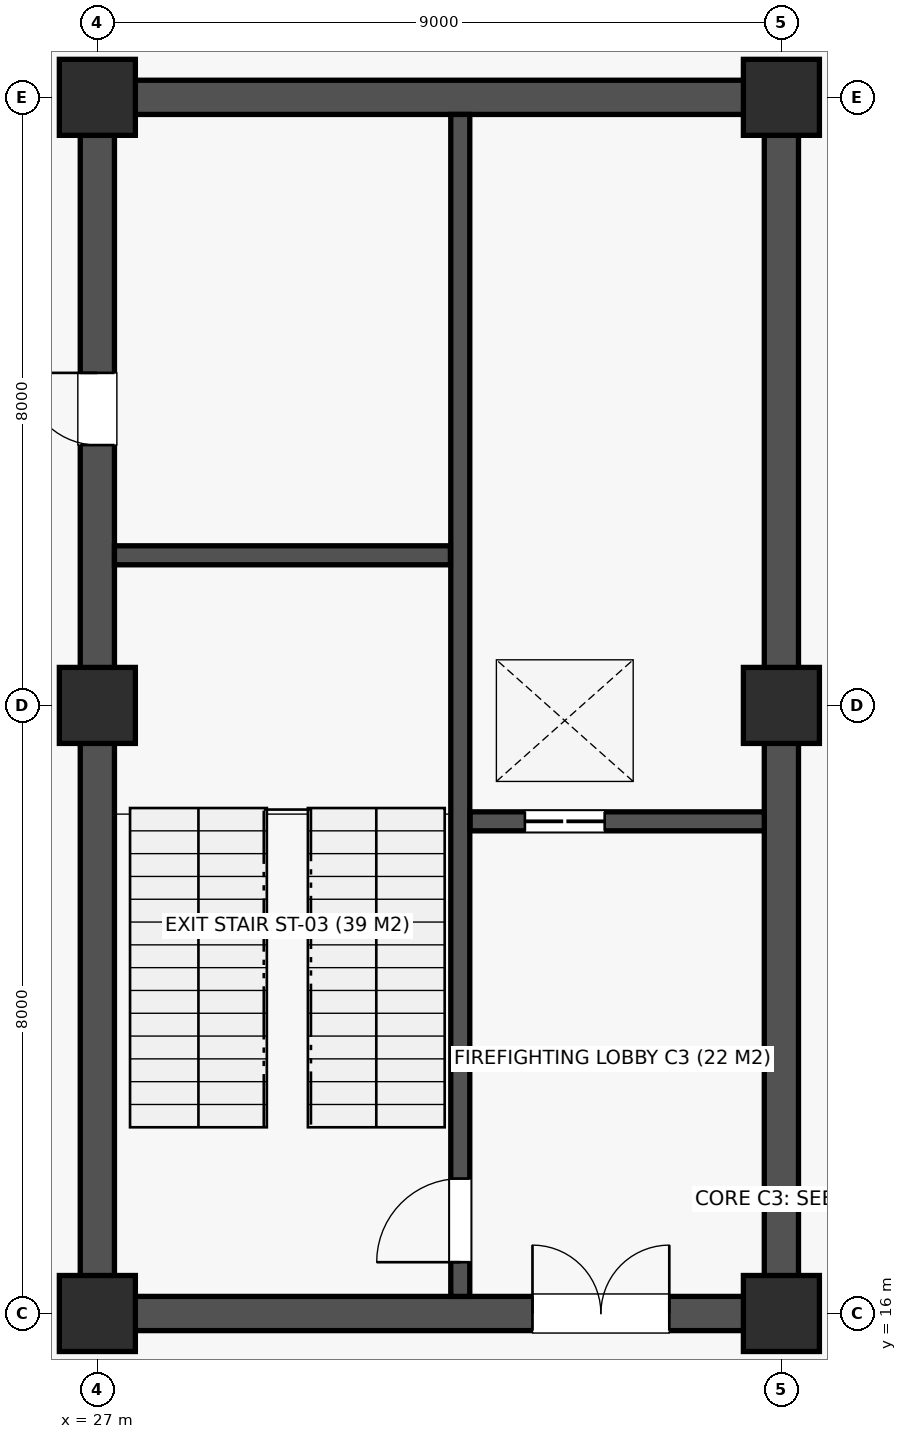
"""IFC4 building model, lengths in metres.
Left out: names, types, materials, properties, quantities, classifications, styles, units other than length and angle.
Written with IfcOpenShell. Run it as: python <this file> out.ifc"""

import sys

from ifc_helpers import new_model, si_unit, direction, frame, frame_2d, origin, origin_2d, place, context, subcontext, project, spatial, rectangle, extrude, element, fill, save


model = new_model("IFC4")
c1 = context("Model", 3, precision=1e-05, world=origin(), true_north=direction((0.0, 1.0)))
c2 = subcontext(c1, "Body", "Model", "MODEL_VIEW")
j1 = project(units=[si_unit("LENGTHUNIT", "METRE"), si_unit("PLANEANGLEUNIT", "RADIAN")], contexts=[c1])
p1 = place(None, origin())
s1 = spatial("IfcSite", under=j1, at=p1, CompositionType="ELEMENT")
p2 = place(p1, origin())
s2 = spatial("IfcBuilding", under=s1, at=p2, CompositionType="ELEMENT")
p3 = place(p2, frame((0.0, 0.0, -9.0)))
s3 = spatial("IfcBuildingStorey", under=s2, at=p3, CompositionType="ELEMENT", Elevation=-9.0)
for number, where, z_axis, x_axis in (
    (1, (27.0, 16.0, 0.0), (0.0, 0.0, 1.0), (1.0, 0.0, 0.0)),
    (2, (27.0, 24.0, 0.0), (0.0, 0.0, 1.0), (1.0, 0.0, 0.0)),
    (3, (27.0, 32.0, 0.0), (0.0, 0.0, 1.0), (1.0, 0.0, 0.0)),
    (4, (36.0, 16.0, 0.0), (0.0, 0.0, 1.0), (1.0, 0.0, 0.0)),
    (5, (36.0, 24.0, 0.0), (0.0, 0.0, 1.0), (1.0, 0.0, 0.0)),
    (6, (36.0, 32.0, 0.0), (0.0, 0.0, 1.0), (1.0, 0.0, 0.0)),
):
    element("IfcColumn", number, at=place(p3, frame(where, z_axis=z_axis, x_axis=x_axis)), inside=s3, PredefinedType="COLUMN", context=c2, shape_type="SweptSolid", body=[
        extrude(rectangle(XDim=1.0, YDim=1.0, at=origin_2d()), origin(), (0.0, 0.0, 1.0), 4.5),
    ])
p4 = place(p3, frame((27.225, 16.0, 0.0), z_axis=(0.0, 0.0, 1.0), x_axis=(1.0, 0.0, 0.0)))
e7 = element("IfcWall", 7, at=p4, inside=s3, PredefinedType="SHEAR", context=c2, shape_type="SweptSolid", body=[
    extrude(rectangle(XDim=8.55, YDim=0.45, at=frame_2d((4.275, 0.0))), origin(), (0.0, 0.0, 1.0), 4.2),
])
p5 = place(p4, frame((5.5, 0.0, 0.0)))
e8 = element("IfcOpeningElement", 8, at=p5, cuts=e7, PredefinedType="OPENING", context=c2, shape_type="SweptSolid", body=[
    extrude(rectangle(XDim=1.8, YDim=2.18, at=frame_2d((0.9, 1.09))), frame((0.0, 0.237, 0.0), z_axis=(0.0, -1.0, 0.0), x_axis=(1.0, 0.0, 0.0)), (0.0, 0.0, 1.0), 0.474),
])
p6 = place(p3, frame((27.225, 32.0, 0.0), z_axis=(0.0, 0.0, 1.0), x_axis=(1.0, 0.0, 0.0)))
e9 = element("IfcWall", 9, at=p6, inside=s3, PredefinedType="SHEAR", context=c2, shape_type="SweptSolid", body=[
    extrude(rectangle(XDim=8.55, YDim=0.45, at=frame_2d((4.275, 0.0))), origin(), (0.0, 0.0, 1.0), 4.2),
])
p7 = place(p3, frame((27.0, 16.225, 0.0), z_axis=(0.0, 0.0, 1.0), x_axis=(0.0, 1.0, 0.0)))
e10 = element("IfcWall", 10, at=p7, inside=s3, PredefinedType="SHEAR", context=c2, shape_type="SweptSolid", body=[
    extrude(rectangle(XDim=15.55, YDim=0.45, at=frame_2d((7.775, 0.0))), origin(), (0.0, 0.0, 1.0), 4.2),
])
p8 = place(p7, frame((11.2, 0.0, 0.0)))
e11 = element("IfcOpeningElement", 11, at=p8, cuts=e10, PredefinedType="OPENING", context=c2, shape_type="SweptSolid", body=[
    extrude(rectangle(XDim=0.95, YDim=2.1, at=frame_2d((0.475, 1.05))), frame((0.0, 0.237, 0.0), z_axis=(0.0, -1.0, 0.0), x_axis=(1.0, 0.0, 0.0)), (0.0, 0.0, 1.0), 0.474),
])
p9 = place(p3, frame((36.0, 16.225, 0.0), z_axis=(0.0, 0.0, 1.0), x_axis=(0.0, 1.0, 0.0)))
e12 = element("IfcWall", 12, at=p9, inside=s3, PredefinedType="SHEAR", context=c2, shape_type="SweptSolid", body=[
    extrude(rectangle(XDim=15.55, YDim=0.45, at=frame_2d((7.775, 0.0))), origin(), (0.0, 0.0, 1.0), 4.2),
])
p10 = place(p3, frame((31.775, 16.225, 0.0), z_axis=(0.0, 0.0, 1.0), x_axis=(0.0, 1.0, 0.0)))
e13 = element("IfcWall", 13, at=p10, inside=s3, PredefinedType="SOLIDWALL", context=c2, shape_type="SweptSolid", body=[
    extrude(rectangle(XDim=15.55, YDim=0.25, at=frame_2d((7.775, 0.0))), origin(), (0.0, 0.0, 1.0), 4.2),
])
p11 = place(p10, frame((0.45, 0.0, 0.0)))
e14 = element("IfcOpeningElement", 14, at=p11, cuts=e13, PredefinedType="OPENING", context=c2, shape_type="SweptSolid", body=[
    extrude(rectangle(XDim=1.1, YDim=2.15, at=frame_2d((0.55, 1.075))), frame((0.0, 0.137, 0.0), z_axis=(0.0, -1.0, 0.0), x_axis=(1.0, 0.0, 0.0)), (0.0, 0.0, 1.0), 0.274),
])
p12 = place(p3, frame((27.225, 25.975, 0.0), z_axis=(0.0, 0.0, 1.0), x_axis=(1.0, 0.0, 0.0)))
e15 = element("IfcWall", 15, at=p12, inside=s3, PredefinedType="SOLIDWALL", context=c2, shape_type="SweptSolid", body=[
    extrude(rectangle(XDim=4.42, YDim=0.25, at=frame_2d((2.21, 0.0))), origin(), (0.0, 0.0, 1.0), 4.2),
])
p13 = place(p3, frame((31.905, 22.475, 0.0), z_axis=(0.0, 0.0, 1.0), x_axis=(1.0, 0.0, 0.0)))
e16 = element("IfcWall", 16, at=p13, inside=s3, PredefinedType="SOLIDWALL", context=c2, shape_type="SweptSolid", body=[
    extrude(rectangle(XDim=3.87, YDim=0.25, at=frame_2d((1.935, 0.0))), origin(), (0.0, 0.0, 1.0), 4.2),
])
p14 = place(p13, frame((0.72, 0.0, 0.0)))
e17 = element("IfcOpeningElement", 17, at=p14, cuts=e16, PredefinedType="OPENING", context=c2, shape_type="SweptSolid", body=[
    extrude(rectangle(XDim=1.05, YDim=2.12, at=frame_2d((0.525, 1.06))), frame((0.0, 0.137, 0.0), z_axis=(0.0, -1.0, 0.0), x_axis=(1.0, 0.0, 0.0)), (0.0, 0.0, 1.0), 0.274),
])
p15 = place(p5, origin())
e18 = element("IfcDoor", 18, at=p15, inside=s3, OperationType="DOUBLE_DOOR_SINGLE_SWING", PredefinedType="DOOR", context=c2, shape_type="SweptSolid", body=[
    extrude(rectangle(XDim=1.8, YDim=2.18, at=frame_2d((0.9, 1.09))), frame((0.0, 0.025, 0.0), z_axis=(0.0, -1.0, 0.0), x_axis=(1.0, 0.0, 0.0)), (0.0, 0.0, 1.0), 0.05),
])
fill(e8, e18)
p16 = place(p11, origin())
e19 = element("IfcDoor", 19, at=p16, inside=s3, OperationType="SINGLE_SWING_LEFT", PredefinedType="DOOR", context=c2, shape_type="SweptSolid", body=[
    extrude(rectangle(XDim=1.1, YDim=2.15, at=frame_2d((0.55, 1.075))), frame((0.0, 0.025, 0.0), z_axis=(0.0, -1.0, 0.0), x_axis=(1.0, 0.0, 0.0)), (0.0, 0.0, 1.0), 0.05),
])
fill(e14, e19)
p17 = place(p8, origin())
e20 = element("IfcDoor", 20, at=p17, inside=s3, OperationType="SINGLE_SWING_RIGHT", PredefinedType="DOOR", context=c2, shape_type="SweptSolid", body=[
    extrude(rectangle(XDim=0.95, YDim=2.1, at=frame_2d((0.475, 1.05))), frame((0.0, 0.025, 0.0), z_axis=(0.0, -1.0, 0.0), x_axis=(1.0, 0.0, 0.0)), (0.0, 0.0, 1.0), 0.05),
])
fill(e11, e20)
p18 = place(p14, origin())
e21 = element("IfcDoor", 21, at=p18, inside=s3, OperationType="DOUBLE_DOOR_SLIDING", PredefinedType="DOOR", context=c2, shape_type="SweptSolid", body=[
    extrude(rectangle(XDim=1.05, YDim=2.12, at=frame_2d((0.525, 1.06))), frame((0.0, 0.025, 0.0), z_axis=(0.0, -1.0, 0.0), x_axis=(1.0, 0.0, 0.0)), (0.0, 0.0, 1.0), 0.05),
])
fill(e17, e21)
save(model, sys.argv[1])
